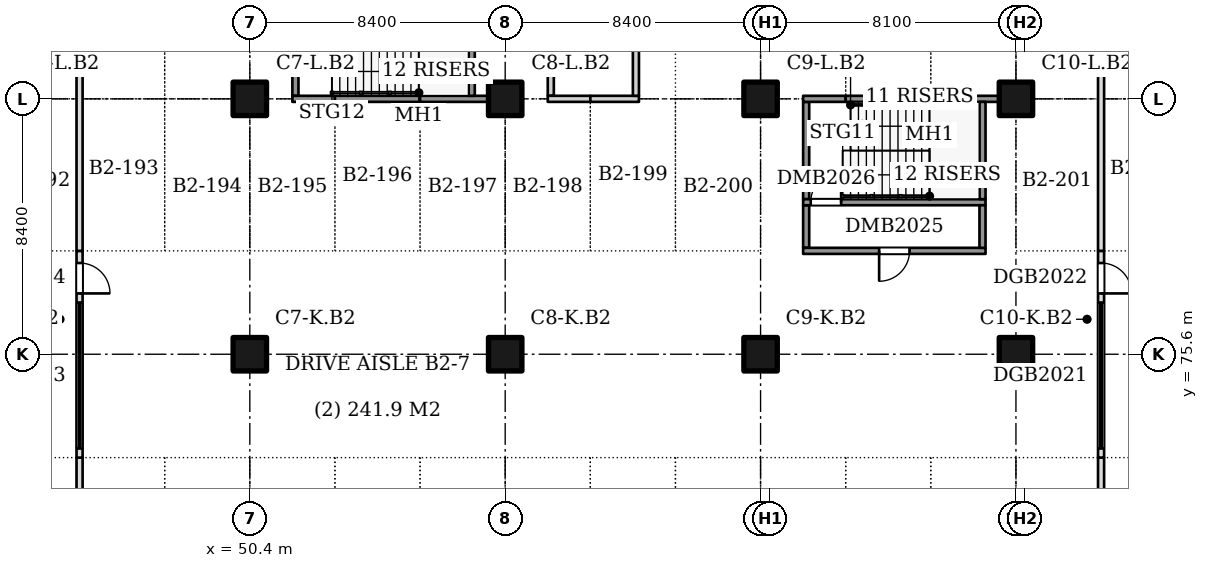
"""IFC4 building model, lengths in metres.
Left out: names, types, materials, properties, quantities, classifications, styles, units other than length and angle.
Written with IfcOpenShell. Run it as: python <this file> out.ifc"""

import sys

from ifc_helpers import new_model, si_unit, direction, frame, frame_2d, origin, origin_2d, place, context, subcontext, project, spatial, rectangle, extrude, element, fill, save


model = new_model("IFC4")
c1 = context("Model", 3, precision=1e-05, world=origin(), true_north=direction((0.0, 1.0)))
c2 = subcontext(c1, "Body", "Model", "MODEL_VIEW")
j1 = project(units=[si_unit("LENGTHUNIT", "METRE"), si_unit("PLANEANGLEUNIT", "RADIAN")], contexts=[c1])
p1 = place(None, origin())
s1 = spatial("IfcSite", under=j1, at=p1, CompositionType="ELEMENT")
p2 = place(p1, origin())
s2 = spatial("IfcBuilding", under=s1, at=p2, CompositionType="ELEMENT")
p3 = place(p2, frame((0.0, 0.0, -8.0)))
s3 = spatial("IfcBuildingStorey", under=s2, at=p3, CompositionType="ELEMENT", Elevation=-8.0)
for number, where, z_axis, x_axis in (
    (1, (50.4, 75.6, 0.0), (0.0, 0.0, 1.0), (1.0, 0.0, 0.0)),
    (2, (50.4, 84.0, 0.0), (0.0, 0.0, 1.0), (1.0, 0.0, 0.0)),
    (3, (58.8, 75.6, 0.0), (0.0, 0.0, 1.0), (1.0, 0.0, 0.0)),
    (4, (58.8, 84.0, 0.0), (0.0, 0.0, 1.0), (1.0, 0.0, 0.0)),
    (5, (67.2, 75.6, 0.0), (0.0, 0.0, 1.0), (1.0, 0.0, 0.0)),
    (6, (67.2, 84.0, 0.0), (0.0, 0.0, 1.0), (1.0, 0.0, 0.0)),
    (7, (75.6, 75.6, 0.0), (0.0, 0.0, 1.0), (1.0, 0.0, 0.0)),
    (8, (75.6, 84.0, 0.0), (0.0, 0.0, 1.0), (1.0, 0.0, 0.0)),
):
    element("IfcColumn", number, at=place(p3, frame(where, z_axis=z_axis, x_axis=x_axis)), inside=s3, PredefinedType="COLUMN", context=c2, shape_type="SweptSolid", body=[
        extrude(rectangle(XDim=1.1, YDim=1.1, at=origin_2d()), origin(), (0.0, 0.0, 1.0), 3.7),
    ])
p4 = place(p3, frame((51.9, 84.1, 0.0), z_axis=(0.0, 0.0, 1.0), x_axis=(0.0, 1.0, 0.0)))
e9 = element("IfcWall", 9, at=p4, inside=s3, PredefinedType="SOLIDWALL", context=c2, shape_type="SweptSolid", body=[
    extrude(rectangle(XDim=3.2, YDim=0.2, at=frame_2d((1.6, 0.0))), origin(), (0.0, 0.0, 1.0), 3.7),
])
p5 = place(p3, frame((51.8, 84.0, 0.0), z_axis=(0.0, 0.0, 1.0), x_axis=(1.0, 0.0, 0.0)))
e10 = element("IfcWall", 10, at=p5, inside=s3, PredefinedType="SOLIDWALL", context=c2, shape_type="SweptSolid", body=[
    extrude(rectangle(XDim=1.4, YDim=0.2, at=frame_2d((0.7, 0.0))), origin(), (0.0, 0.0, 1.0), 3.7),
])
p6 = place(p3, frame((53.2, 84.0, 0.0), z_axis=(0.0, 0.0, 1.0), x_axis=(1.0, 0.0, 0.0)))
e11 = element("IfcWall", 11, at=p6, inside=s3, PredefinedType="SOLIDWALL", context=c2, shape_type="SweptSolid", body=[
    extrude(rectangle(XDim=2.8, YDim=0.2, at=frame_2d((1.4, 0.0))), origin(), (0.0, 0.0, 1.0), 3.7),
])
p7 = place(p3, frame((56.0, 84.0, 0.0), z_axis=(0.0, 0.0, 1.0), x_axis=(1.0, 0.0, 0.0)))
e12 = element("IfcWall", 12, at=p7, inside=s3, PredefinedType="SOLIDWALL", context=c2, shape_type="SweptSolid", body=[
    extrude(rectangle(XDim=2.25, YDim=0.2, at=frame_2d((1.125, 0.0))), origin(), (0.0, 0.0, 1.0), 3.7),
])
p8 = place(p3, frame((57.7, 84.1, 0.0), z_axis=(0.0, 0.0, 1.0), x_axis=(0.0, 1.0, 0.0)))
e13 = element("IfcWall", 13, at=p8, inside=s3, PredefinedType="SOLIDWALL", context=c2, shape_type="SweptSolid", body=[
    extrude(rectangle(XDim=3.2, YDim=0.2, at=frame_2d((1.6, 0.0))), origin(), (0.0, 0.0, 1.0), 3.7),
])
p9 = place(p3, frame((60.3, 84.1, 0.0), z_axis=(0.0, 0.0, 1.0), x_axis=(0.0, 1.0, 0.0)))
e14 = element("IfcWall", 14, at=p9, inside=s3, PredefinedType="PARTITIONING", context=c2, shape_type="SweptSolid", body=[
    extrude(rectangle(XDim=4.8, YDim=0.2, at=frame_2d((2.4, 0.0))), origin(), (0.0, 0.0, 1.0), 3.7),
])
p10 = place(p9, frame((1.9, 0.0, 0.0)))
e15 = element("IfcOpeningElement", 15, at=p10, cuts=e14, PredefinedType="OPENING", context=c2, shape_type="SweptSolid", body=[
    extrude(rectangle(XDim=1.0, YDim=2.1, at=frame_2d((0.5, 1.05))), frame((0.0, 0.11, 0.0), z_axis=(0.0, -1.0, 0.0), x_axis=(1.0, 0.0, 0.0)), (0.0, 0.0, 1.0), 0.22),
])
p11 = place(p3, frame((60.2, 84.0, 0.0), z_axis=(0.0, 0.0, 1.0), x_axis=(1.0, 0.0, 0.0)))
e16 = element("IfcWall", 16, at=p11, inside=s3, PredefinedType="PARTITIONING", context=c2, shape_type="SweptSolid", body=[
    extrude(rectangle(XDim=1.4, YDim=0.2, at=frame_2d((0.7, 0.0))), origin(), (0.0, 0.0, 1.0), 3.7),
])
p12 = place(p3, frame((61.6, 84.0, 0.0), z_axis=(0.0, 0.0, 1.0), x_axis=(1.0, 0.0, 0.0)))
e17 = element("IfcWall", 17, at=p12, inside=s3, PredefinedType="PARTITIONING", context=c2, shape_type="SweptSolid", body=[
    extrude(rectangle(XDim=1.6, YDim=0.2, at=frame_2d((0.8, 0.0))), origin(), (0.0, 0.0, 1.0), 3.7),
])
p13 = place(p3, frame((63.1, 84.1, 0.0), z_axis=(0.0, 0.0, 1.0), x_axis=(0.0, 1.0, 0.0)))
e18 = element("IfcWall", 18, at=p13, inside=s3, PredefinedType="PARTITIONING", context=c2, shape_type="SweptSolid", body=[
    extrude(rectangle(XDim=4.8, YDim=0.2, at=frame_2d((2.4, 0.0))), origin(), (0.0, 0.0, 1.0), 3.7),
])
p14 = place(p3, frame((68.7, 79.1, 0.0), z_axis=(0.0, 0.0, 1.0), x_axis=(0.0, 1.0, 0.0)))
e19 = element("IfcWall", 19, at=p14, inside=s3, PredefinedType="SOLIDWALL", context=c2, shape_type="SweptSolid", body=[
    extrude(rectangle(XDim=1.4, YDim=0.2, at=frame_2d((0.7, 0.0))), origin(), (0.0, 0.0, 1.0), 3.7),
])
p15 = place(p3, frame((68.6, 79.0, 0.0), z_axis=(0.0, 0.0, 1.0), x_axis=(1.0, 0.0, 0.0)))
e20 = element("IfcWall", 20, at=p15, inside=s3, PredefinedType="SOLIDWALL", context=c2, shape_type="SweptSolid", body=[
    extrude(rectangle(XDim=6.0, YDim=0.2, at=frame_2d((3.0, 0.0))), origin(), (0.0, 0.0, 1.0), 3.7),
])
p16 = place(p15, frame((2.5, 0.0, 0.0)))
e21 = element("IfcOpeningElement", 21, at=p16, cuts=e20, PredefinedType="OPENING", context=c2, shape_type="SweptSolid", body=[
    extrude(rectangle(XDim=1.0, YDim=2.1, at=frame_2d((0.5, 1.05))), frame((0.0, 0.11, 0.0), z_axis=(0.0, -1.0, 0.0), x_axis=(1.0, 0.0, 0.0)), (0.0, 0.0, 1.0), 0.22),
])
p17 = place(p3, frame((68.7, 80.7, 0.0), z_axis=(0.0, 0.0, 1.0), x_axis=(0.0, 1.0, 0.0)))
e22 = element("IfcWall", 22, at=p17, inside=s3, PredefinedType="SOLIDWALL", context=c2, shape_type="SweptSolid", body=[
    extrude(rectangle(XDim=3.2, YDim=0.2, at=frame_2d((1.6, 0.0))), origin(), (0.0, 0.0, 1.0), 3.7),
])
p18 = place(p3, frame((68.6, 80.6, 0.0), z_axis=(0.0, 0.0, 1.0), x_axis=(1.0, 0.0, 0.0)))
e23 = element("IfcWall", 23, at=p18, inside=s3, PredefinedType="SOLIDWALL", context=c2, shape_type="SweptSolid", body=[
    extrude(rectangle(XDim=6.0, YDim=0.2, at=frame_2d((3.0, 0.0))), origin(), (0.0, 0.0, 1.0), 3.7),
])
p19 = place(p18, frame((0.25, 0.0, 0.0)))
e24 = element("IfcOpeningElement", 24, at=p19, cuts=e23, PredefinedType="OPENING", context=c2, shape_type="SweptSolid", body=[
    extrude(rectangle(XDim=1.0, YDim=2.1, at=frame_2d((0.5, 1.05))), frame((0.0, 0.11, 0.0), z_axis=(0.0, -1.0, 0.0), x_axis=(1.0, 0.0, 0.0)), (0.0, 0.0, 1.0), 0.22),
])
p20 = place(p3, frame((68.6, 84.0, 0.0), z_axis=(0.0, 0.0, 1.0), x_axis=(1.0, 0.0, 0.0)))
e25 = element("IfcWall", 25, at=p20, inside=s3, PredefinedType="SOLIDWALL", context=c2, shape_type="SweptSolid", body=[
    extrude(rectangle(XDim=1.4, YDim=0.2, at=frame_2d((0.7, 0.0))), origin(), (0.0, 0.0, 1.0), 3.7),
])
p21 = place(p3, frame((70.0, 84.0, 0.0), z_axis=(0.0, 0.0, 1.0), x_axis=(1.0, 0.0, 0.0)))
e26 = element("IfcWall", 26, at=p21, inside=s3, PredefinedType="SOLIDWALL", context=c2, shape_type="SweptSolid", body=[
    extrude(rectangle(XDim=2.8, YDim=0.2, at=frame_2d((1.4, 0.0))), origin(), (0.0, 0.0, 1.0), 3.7),
])
p22 = place(p3, frame((72.8, 84.0, 0.0), z_axis=(0.0, 0.0, 1.0), x_axis=(1.0, 0.0, 0.0)))
e27 = element("IfcWall", 27, at=p22, inside=s3, PredefinedType="SOLIDWALL", context=c2, shape_type="SweptSolid", body=[
    extrude(rectangle(XDim=2.25, YDim=0.2, at=frame_2d((1.125, 0.0))), origin(), (0.0, 0.0, 1.0), 3.7),
])
p23 = place(p3, frame((74.5, 79.1, 0.0), z_axis=(0.0, 0.0, 1.0), x_axis=(0.0, 1.0, 0.0)))
e28 = element("IfcWall", 28, at=p23, inside=s3, PredefinedType="SOLIDWALL", context=c2, shape_type="SweptSolid", body=[
    extrude(rectangle(XDim=1.4, YDim=0.2, at=frame_2d((0.7, 0.0))), origin(), (0.0, 0.0, 1.0), 3.7),
])
p24 = place(p3, frame((74.5, 80.7, 0.0), z_axis=(0.0, 0.0, 1.0), x_axis=(0.0, 1.0, 0.0)))
e29 = element("IfcWall", 29, at=p24, inside=s3, PredefinedType="SOLIDWALL", context=c2, shape_type="SweptSolid", body=[
    extrude(rectangle(XDim=3.2, YDim=0.2, at=frame_2d((1.6, 0.0))), origin(), (0.0, 0.0, 1.0), 3.7),
])
p25 = place(p3, frame((44.8, 62.2, 0.0), z_axis=(0.0, 0.0, 1.0), x_axis=(0.0, 1.0, 0.0)))
e30 = element("IfcWall", 30, at=p25, inside=s3, PredefinedType="PARTITIONING", context=c2, shape_type="SweptSolid", body=[
    extrude(rectangle(XDim=10.0, YDim=0.2, at=frame_2d((5.0, 0.0))), origin(), (0.0, 0.0, 1.0), 3.7),
])
p26 = place(p3, frame((44.8, 72.2, 0.0), z_axis=(0.0, 0.0, 1.0), x_axis=(0.0, 1.0, 0.0)))
e31 = element("IfcWall", 31, at=p26, inside=s3, PredefinedType="PARTITIONING", context=c2, shape_type="SweptSolid", body=[
    extrude(rectangle(XDim=6.8, YDim=0.2, at=frame_2d((3.4, 0.0))), origin(), (0.0, 0.0, 1.0), 3.7),
])
p27 = place(p26, frame((0.3, 0.0, 0.0)))
e32 = element("IfcOpeningElement", 32, at=p27, cuts=e31, PredefinedType="OPENING", context=c2, shape_type="SweptSolid", body=[
    extrude(rectangle(XDim=4.8, YDim=2.4, at=frame_2d((2.4, 1.2))), frame((0.0, 0.11, 0.0), z_axis=(0.0, -1.0, 0.0), x_axis=(1.0, 0.0, 0.0)), (0.0, 0.0, 1.0), 0.22),
])
p28 = place(p26, frame((5.4, 0.0, 0.0)))
e33 = element("IfcOpeningElement", 33, at=p28, cuts=e31, PredefinedType="OPENING", context=c2, shape_type="SweptSolid", body=[
    extrude(rectangle(XDim=1.0, YDim=2.1, at=frame_2d((0.5, 1.05))), frame((0.0, 0.11, 0.0), z_axis=(0.0, -1.0, 0.0), x_axis=(1.0, 0.0, 0.0)), (0.0, 0.0, 1.0), 0.22),
])
for number, where, z_axis, x_axis in (
    (34, (44.8, 79.0, 0.0), (0.0, 0.0, 1.0), (0.0, 1.0, 0.0)),
    (35, (78.4, 62.2, 0.0), (0.0, 0.0, 1.0), (0.0, 1.0, 0.0)),
):
    element("IfcWall", number, at=place(p3, frame(where, z_axis=z_axis, x_axis=x_axis)), inside=s3, PredefinedType="PARTITIONING", context=c2, shape_type="SweptSolid", body=[
        extrude(rectangle(XDim=10.0, YDim=0.2, at=frame_2d((5.0, 0.0))), origin(), (0.0, 0.0, 1.0), 3.7),
    ])
p29 = place(p3, frame((78.4, 72.2, 0.0), z_axis=(0.0, 0.0, 1.0), x_axis=(0.0, 1.0, 0.0)))
e36 = element("IfcWall", 36, at=p29, inside=s3, PredefinedType="PARTITIONING", context=c2, shape_type="SweptSolid", body=[
    extrude(rectangle(XDim=6.8, YDim=0.2, at=frame_2d((3.4, 0.0))), origin(), (0.0, 0.0, 1.0), 3.7),
])
p30 = place(p29, frame((0.3, 0.0, 0.0)))
e37 = element("IfcOpeningElement", 37, at=p30, cuts=e36, PredefinedType="OPENING", context=c2, shape_type="SweptSolid", body=[
    extrude(rectangle(XDim=4.8, YDim=2.4, at=frame_2d((2.4, 1.2))), frame((0.0, 0.11, 0.0), z_axis=(0.0, -1.0, 0.0), x_axis=(1.0, 0.0, 0.0)), (0.0, 0.0, 1.0), 0.22),
])
p31 = place(p29, frame((5.4, 0.0, 0.0)))
e38 = element("IfcOpeningElement", 38, at=p31, cuts=e36, PredefinedType="OPENING", context=c2, shape_type="SweptSolid", body=[
    extrude(rectangle(XDim=1.0, YDim=2.1, at=frame_2d((0.5, 1.05))), frame((0.0, 0.11, 0.0), z_axis=(0.0, -1.0, 0.0), x_axis=(1.0, 0.0, 0.0)), (0.0, 0.0, 1.0), 0.22),
])
p32 = place(p3, frame((78.4, 79.0, 0.0), z_axis=(0.0, 0.0, 1.0), x_axis=(0.0, 1.0, 0.0)))
e39 = element("IfcWall", 39, at=p32, inside=s3, PredefinedType="PARTITIONING", context=c2, shape_type="SweptSolid", body=[
    extrude(rectangle(XDim=10.0, YDim=0.2, at=frame_2d((5.0, 0.0))), origin(), (0.0, 0.0, 1.0), 3.7),
])
p33 = place(p16, frame((1.0, 0.0, 0.0), z_axis=(0.0, 0.0, 1.0), x_axis=(-1.0, 0.0, 0.0)))
e40 = element("IfcDoor", 40, at=p33, inside=s3, OperationType="SINGLE_SWING_RIGHT", PredefinedType="DOOR", context=c2, shape_type="SweptSolid", body=[
    extrude(rectangle(XDim=1.0, YDim=2.1, at=frame_2d((0.5, 1.05))), frame((0.0, 0.025, 0.0), z_axis=(0.0, -1.0, 0.0), x_axis=(1.0, 0.0, 0.0)), (0.0, 0.0, 1.0), 0.05),
])
fill(e21, e40)
p34 = place(p19, origin())
e41 = element("IfcDoor", 41, at=p34, inside=s3, OperationType="SINGLE_SWING_RIGHT", PredefinedType="DOOR", context=c2, shape_type="SweptSolid", body=[
    extrude(rectangle(XDim=1.0, YDim=2.1, at=frame_2d((0.5, 1.05))), frame((0.0, 0.025, 0.0), z_axis=(0.0, -1.0, 0.0), x_axis=(1.0, 0.0, 0.0)), (0.0, 0.0, 1.0), 0.05),
])
fill(e24, e41)
p35 = place(p27, origin())
e42 = element("IfcDoor", 42, at=p35, inside=s3, OperationType="ROLLINGUP", PredefinedType="GATE", context=c2, shape_type="SweptSolid", body=[
    extrude(rectangle(XDim=4.8, YDim=2.4, at=frame_2d((2.4, 1.2))), frame((0.0, 0.025, 0.0), z_axis=(0.0, -1.0, 0.0), x_axis=(1.0, 0.0, 0.0)), (0.0, 0.0, 1.0), 0.05),
])
fill(e32, e42)
p36 = place(p28, frame((1.0, 0.0, 0.0), z_axis=(0.0, 0.0, 1.0), x_axis=(-1.0, 0.0, 0.0)))
e43 = element("IfcDoor", 43, at=p36, inside=s3, OperationType="SINGLE_SWING_RIGHT", PredefinedType="DOOR", context=c2, shape_type="SweptSolid", body=[
    extrude(rectangle(XDim=1.0, YDim=2.1, at=frame_2d((0.5, 1.05))), frame((0.0, 0.025, 0.0), z_axis=(0.0, -1.0, 0.0), x_axis=(1.0, 0.0, 0.0)), (0.0, 0.0, 1.0), 0.05),
])
fill(e33, e43)
p37 = place(p30, origin())
e44 = element("IfcDoor", 44, at=p37, inside=s3, OperationType="ROLLINGUP", PredefinedType="GATE", context=c2, shape_type="SweptSolid", body=[
    extrude(rectangle(XDim=4.8, YDim=2.4, at=frame_2d((2.4, 1.2))), frame((0.0, 0.025, 0.0), z_axis=(0.0, -1.0, 0.0), x_axis=(1.0, 0.0, 0.0)), (0.0, 0.0, 1.0), 0.05),
])
fill(e37, e44)
p38 = place(p31, frame((1.0, 0.0, 0.0), z_axis=(0.0, 0.0, 1.0), x_axis=(-1.0, 0.0, 0.0)))
e45 = element("IfcDoor", 45, at=p38, inside=s3, OperationType="SINGLE_SWING_RIGHT", PredefinedType="DOOR", context=c2, shape_type="SweptSolid", body=[
    extrude(rectangle(XDim=1.0, YDim=2.1, at=frame_2d((0.5, 1.05))), frame((0.0, 0.025, 0.0), z_axis=(0.0, -1.0, 0.0), x_axis=(1.0, 0.0, 0.0)), (0.0, 0.0, 1.0), 0.05),
])
fill(e38, e45)
save(model, sys.argv[1])
